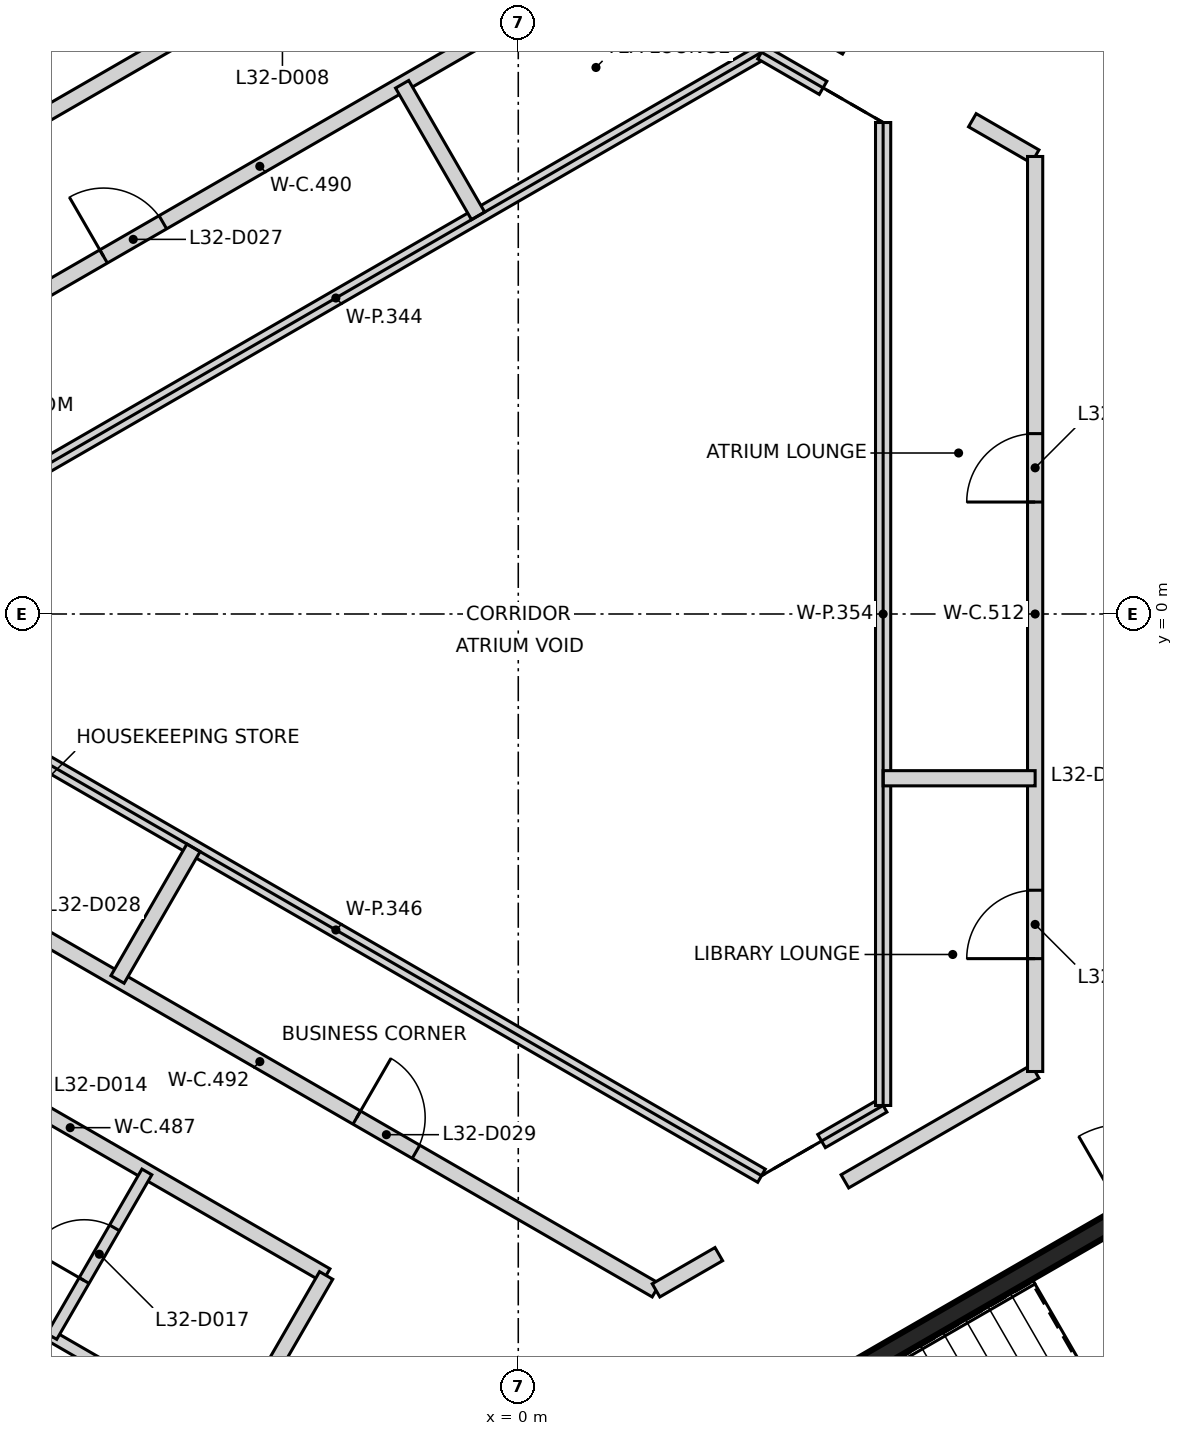
"""IFC4 building model, lengths in metres.
Left out: names, types, materials, properties, quantities, classifications, styles, units other than length and angle.
Written with IfcOpenShell. Run it as: python <this file> out.ifc"""

import sys

from ifc_helpers import new_model, si_unit, direction, frame, frame_2d, origin, place, context, subcontext, project, spatial, rectangle, extrude, element, fill, save


model = new_model("IFC4")
c1 = context("Model", 3, precision=1e-05, world=origin(), true_north=direction((0.0, 1.0)))
c2 = subcontext(c1, "Body", "Model", "MODEL_VIEW")
j1 = project(units=[si_unit("LENGTHUNIT", "METRE"), si_unit("PLANEANGLEUNIT", "RADIAN")], contexts=[c1])
p1 = place(None, origin())
s1 = spatial("IfcSite", under=j1, at=p1, CompositionType="ELEMENT")
p2 = place(p1, origin())
s2 = spatial("IfcBuilding", under=s1, at=p2, CompositionType="ELEMENT")
p3 = place(p2, frame((0.0, 0.0, 132.4)))
s3 = spatial("IfcBuildingStorey", under=s2, at=p3, CompositionType="ELEMENT", Elevation=132.4)
p4 = place(p3, frame((10.42, 6.498, 0.0), z_axis=(0.0, 0.0, 1.0), x_axis=(-0.866021906294, 0.500006057782, 0.0)))
e1 = element("IfcWall", 1, at=p4, inside=s3, PredefinedType="SHEAR", context=c2, shape_type="SweptSolid", body=[
    extrude(rectangle(XDim=11.55, YDim=0.25, at=frame_2d((5.775, 0.0))), origin(), (0.0, 0.0, 1.0), 3.2),
])
p5 = place(p4, frame((10.025, 0.0, 0.0)))
e2 = element("IfcOpeningElement", 2, at=p5, cuts=e1, PredefinedType="OPENING", context=c2, shape_type="SweptSolid", body=[
    extrude(rectangle(XDim=1.2, YDim=2.1, at=frame_2d((0.6, 1.05))), frame((0.0, 0.135, 0.0), z_axis=(0.0, -1.0, 0.0), x_axis=(1.0, 0.0, 0.0)), (0.0, 0.0, 1.0), 0.27),
])
p6 = place(p4, frame((8.725, 0.0, 0.0)))
e3 = element("IfcOpeningElement", 3, at=p6, cuts=e1, PredefinedType="OPENING", context=c2, shape_type="SweptSolid", body=[
    extrude(rectangle(XDim=1.2, YDim=2.1, at=frame_2d((0.6, 1.05))), frame((0.0, 0.135, 0.0), z_axis=(0.0, -1.0, 0.0), x_axis=(1.0, 0.0, 0.0)), (0.0, 0.0, 1.0), 0.27),
])
p7 = place(p3, frame((0.417, -12.273, 0.0), z_axis=(0.0, 0.0, 1.0), x_axis=(0.866021906294, 0.500006057782, 0.0)))
e4 = element("IfcWall", 4, at=p7, inside=s3, PredefinedType="SHEAR", context=c2, shape_type="SweptSolid", body=[
    extrude(rectangle(XDim=11.55, YDim=0.25, at=frame_2d((5.775, 0.0))), origin(), (0.0, 0.0, 1.0), 3.2),
])
p8 = place(p7, frame((10.025, 0.0, 0.0)))
e5 = element("IfcOpeningElement", 5, at=p8, cuts=e4, PredefinedType="OPENING", context=c2, shape_type="SweptSolid", body=[
    extrude(rectangle(XDim=1.2, YDim=2.1, at=frame_2d((0.6, 1.05))), frame((0.0, 0.135, 0.0), z_axis=(0.0, -1.0, 0.0), x_axis=(1.0, 0.0, 0.0)), (0.0, 0.0, 1.0), 0.27),
])
p9 = place(p7, frame((8.725, 0.0, 0.0)))
e6 = element("IfcOpeningElement", 6, at=p9, cuts=e4, PredefinedType="OPENING", context=c2, shape_type="SweptSolid", body=[
    extrude(rectangle(XDim=1.2, YDim=2.1, at=frame_2d((0.6, 1.05))), frame((0.0, 0.135, 0.0), z_axis=(0.0, -1.0, 0.0), x_axis=(1.0, 0.0, 0.0)), (0.0, 0.0, 1.0), 0.27),
])
p10 = place(p3, frame((-9.262, -4.814, 0.0), z_axis=(0.0, 0.0, 1.0), x_axis=(0.866109782156, -0.499853823887, 0.0)))
e7 = element("IfcWall", 7, at=p10, inside=s3, PredefinedType="PARTITIONING", context=c2, shape_type="SweptSolid", body=[
    extrude(rectangle(XDim=7.776, YDim=0.2, at=frame_2d((3.888, 0.0))), origin(), (0.0, 0.0, 1.0), 3.2),
])
p11 = place(p10, frame((2.314, 0.0, 0.0)))
e8 = element("IfcOpeningElement", 8, at=p11, cuts=e7, PredefinedType="OPENING", context=c2, shape_type="SweptSolid", body=[
    extrude(rectangle(XDim=0.95, YDim=2.1, at=frame_2d((0.475, 1.05))), frame((0.0, 0.11, 0.0), z_axis=(0.0, -1.0, 0.0), x_axis=(1.0, 0.0, 0.0)), (0.0, 0.0, 1.0), 0.22),
])
p12 = place(p3, frame((-8.613, 2.881, 0.0), z_axis=(0.0, 0.0, 1.0), x_axis=(0.866103179807, 0.499865263774, 0.0)))
e9 = element("IfcWall", 9, at=p12, inside=s3, PredefinedType="PARTITIONING", context=c2, shape_type="SweptSolid", body=[
    extrude(rectangle(XDim=12.036, YDim=0.2, at=frame_2d((6.018, 0.0))), origin(), (0.0, 0.0, 1.0), 3.2),
])
p13 = place(p12, frame((9.652, 0.0, 0.0)))
e10 = element("IfcOpeningElement", 10, at=p13, cuts=e9, PredefinedType="OPENING", context=c2, shape_type="SweptSolid", body=[
    extrude(rectangle(XDim=0.9, YDim=2.1, at=frame_2d((0.45, 1.05))), frame((0.0, 0.11, 0.0), z_axis=(0.0, -1.0, 0.0), x_axis=(1.0, 0.0, 0.0)), (0.0, 0.0, 1.0), 0.22),
])
p14 = place(p12, frame((3.646, 0.0, 0.0)))
e11 = element("IfcOpeningElement", 11, at=p14, cuts=e9, PredefinedType="OPENING", context=c2, shape_type="SweptSolid", body=[
    extrude(rectangle(XDim=0.9, YDim=2.1, at=frame_2d((0.45, 1.05))), frame((0.0, 0.11, 0.0), z_axis=(0.0, -1.0, 0.0), x_axis=(1.0, 0.0, 0.0)), (0.0, 0.0, 1.0), 0.22),
])
p15 = place(p3, frame((-8.612, -2.88, 0.0), z_axis=(0.0, 0.0, 1.0), x_axis=(0.866035279512, -0.499982894348, 0.0)))
e12 = element("IfcWall", 12, at=p15, inside=s3, PredefinedType="PARTITIONING", context=c2, shape_type="SweptSolid", body=[
    extrude(rectangle(XDim=12.037, YDim=0.2, at=frame_2d((6.018, 0.0))), origin(), (0.0, 0.0, 1.0), 3.2),
])
p16 = place(p15, frame((1.484, 0.0, 0.0)))
e13 = element("IfcOpeningElement", 13, at=p16, cuts=e12, PredefinedType="OPENING", context=c2, shape_type="SweptSolid", body=[
    extrude(rectangle(XDim=0.9, YDim=2.1, at=frame_2d((0.45, 1.05))), frame((0.0, 0.11, 0.0), z_axis=(0.0, -1.0, 0.0), x_axis=(1.0, 0.0, 0.0)), (0.0, 0.0, 1.0), 0.22),
])
p17 = place(p15, frame((7.491, 0.0, 0.0)))
e14 = element("IfcOpeningElement", 14, at=p17, cuts=e12, PredefinedType="OPENING", context=c2, shape_type="SweptSolid", body=[
    extrude(rectangle(XDim=0.9, YDim=2.1, at=frame_2d((0.45, 1.05))), frame((0.0, 0.11, 0.0), z_axis=(0.0, -1.0, 0.0), x_axis=(1.0, 0.0, 0.0)), (0.0, 0.0, 1.0), 0.22),
])
p18 = place(p3, frame((-7.862, 5.624, 0.0), z_axis=(0.0, 0.0, 1.0), x_axis=(0.866109024618, 0.499855136491, 0.0)))
e15 = element("IfcWall", 15, at=p18, inside=s3, PredefinedType="PARTITIONING", context=c2, shape_type="SweptSolid", body=[
    extrude(rectangle(XDim=9.61, YDim=0.2, at=frame_2d((4.805, 0.0))), origin(), (0.0, 0.0, 1.0), 3.2),
])
p19 = place(p18, frame((6.345, 0.0, 0.0)))
e16 = element("IfcOpeningElement", 16, at=p19, cuts=e15, PredefinedType="OPENING", context=c2, shape_type="SweptSolid", body=[
    extrude(rectangle(XDim=0.95, YDim=2.1, at=frame_2d((0.475, 1.05))), frame((0.0, 0.11, 0.0), z_axis=(0.0, -1.0, 0.0), x_axis=(1.0, 0.0, 0.0)), (0.0, 0.0, 1.0), 0.22),
])
p20 = place(p18, frame((5.02, 0.0, 0.0)))
e17 = element("IfcOpeningElement", 17, at=p20, cuts=e15, PredefinedType="OPENING", context=c2, shape_type="SweptSolid", body=[
    extrude(rectangle(XDim=0.95, YDim=2.1, at=frame_2d((0.475, 1.05))), frame((0.0, 0.11, 0.0), z_axis=(0.0, -1.0, 0.0), x_axis=(1.0, 0.0, 0.0)), (0.0, 0.0, 1.0), 0.22),
])
p21 = place(p3, frame((-4.629, -12.341, 0.0), z_axis=(0.0, 0.0, 1.0), x_axis=(0.500069467685, 0.865985292883, 0.0)))
e18 = element("IfcWall", 18, at=p21, inside=s3, PredefinedType="PARTITIONING", context=c2, shape_type="SweptSolid", body=[
    extrude(rectangle(XDim=4.202, YDim=0.2, at=frame_2d((2.101, 0.0))), origin(), (0.0, 0.0, 1.0), 3.2),
])
p22 = place(p21, frame((0.564, 0.0, 0.0)))
e19 = element("IfcOpeningElement", 19, at=p22, cuts=e18, PredefinedType="OPENING", context=c2, shape_type="SweptSolid", body=[
    extrude(rectangle(XDim=0.95, YDim=2.1, at=frame_2d((0.475, 1.05))), frame((0.0, 0.11, 0.0), z_axis=(0.0, -1.0, 0.0), x_axis=(1.0, 0.0, 0.0)), (0.0, 0.0, 1.0), 0.22),
])
p23 = place(p3, frame((1.812, -8.898, 0.0), z_axis=(0.0, 0.0, 1.0), x_axis=(0.866108878364, 0.499855389907, 0.0)))
e20 = element("IfcWall", 20, at=p23, inside=s3, PredefinedType="PARTITIONING", context=c2, shape_type="SweptSolid", body=[
    extrude(rectangle(XDim=0.954, YDim=0.2, at=frame_2d((0.477, 0.0))), origin(), (0.0, 0.0, 1.0), 3.2),
])
p24 = place(p3, frame((1.813, 8.899, 0.0), z_axis=(0.0, 0.0, 1.0), x_axis=(0.865957732194, -0.50011719232, 0.0)))
e21 = element("IfcWall", 21, at=p24, inside=s3, PredefinedType="PARTITIONING", context=c2, shape_type="SweptSolid", body=[
    extrude(rectangle(XDim=2.891, YDim=0.2, at=frame_2d((1.445, 0.0))), origin(), (0.0, 0.0, 1.0), 2.3),
])
p25 = place(p3, frame((4.297, -7.464, 0.0), z_axis=(0.0, 0.0, 1.0), x_axis=(0.86602521942, 0.500000319328, 0.0)))
e22 = element("IfcWall", 22, at=p25, inside=s3, PredefinedType="PARTITIONING", context=c2, shape_type="SweptSolid", body=[
    extrude(rectangle(XDim=2.89, YDim=0.2, at=frame_2d((1.445, 0.0))), origin(), (0.0, 0.0, 1.0), 2.3),
])
p26 = place(p3, frame((5.974, 6.496, 0.0), z_axis=(0.0, 0.0, 1.0), x_axis=(0.865934055563, -0.500158186394, 0.0)))
e23 = element("IfcWall", 23, at=p26, inside=s3, PredefinedType="PARTITIONING", context=c2, shape_type="SweptSolid", body=[
    extrude(rectangle(XDim=0.954, YDim=0.2, at=frame_2d((0.477, 0.0))), origin(), (0.0, 0.0, 1.0), 3.2),
])
p27 = place(p3, frame((6.8, -6.019, 0.0), z_axis=(0.0, 0.0, 1.0), x_axis=(0.0, 1.0, 0.0)))
e24 = element("IfcWall", 24, at=p27, inside=s3, PredefinedType="PARTITIONING", context=c2, shape_type="SweptSolid", body=[
    extrude(rectangle(XDim=12.038, YDim=0.2, at=frame_2d((6.019, 0.0))), origin(), (0.0, 0.0, 1.0), 3.2),
])
p28 = place(p27, frame((1.485, 0.0, 0.0)))
e25 = element("IfcOpeningElement", 25, at=p28, cuts=e24, PredefinedType="OPENING", context=c2, shape_type="SweptSolid", body=[
    extrude(rectangle(XDim=0.9, YDim=2.1, at=frame_2d((0.45, 1.05))), frame((0.0, 0.11, 0.0), z_axis=(0.0, -1.0, 0.0), x_axis=(1.0, 0.0, 0.0)), (0.0, 0.0, 1.0), 0.22),
])
p29 = place(p27, frame((7.492, 0.0, 0.0)))
e26 = element("IfcOpeningElement", 26, at=p29, cuts=e24, PredefinedType="OPENING", context=c2, shape_type="SweptSolid", body=[
    extrude(rectangle(XDim=0.9, YDim=2.1, at=frame_2d((0.45, 1.05))), frame((0.0, 0.11, 0.0), z_axis=(0.0, -1.0, 0.0), x_axis=(1.0, 0.0, 0.0)), (0.0, 0.0, 1.0), 0.22),
])
for number, where, z_axis, x_axis in (
    (27, (-8.0, 0.924, 0.0), (0.0, 0.0, 1.0), (0.866, 0.5, 0.0)),
    (28, (-8.0, -0.924, 0.0), (0.0, 0.0, 1.0), (0.866, -0.5, 0.0)),
):
    element("IfcWall", number, at=place(p3, frame(where, z_axis=z_axis, x_axis=x_axis)), inside=s3, PredefinedType="PARTITIONING", context=c2, shape_type="SweptSolid", body=[
        extrude(rectangle(XDim=12.932, YDim=0.2, at=frame_2d((6.466, 0.0))), origin(), (0.0, 0.0, 1.0), 2.3),
    ])
p30 = place(p3, frame((-5.272, -4.808, 0.0), z_axis=(0.0, 0.0, 1.0), x_axis=(0.499880961361, 0.866094119867, 0.0)))
e29 = element("IfcWall", 29, at=p30, inside=s3, PredefinedType="PARTITIONING", context=c2, shape_type="SweptSolid", body=[
    extrude(rectangle(XDim=2.0, YDim=0.2, at=frame_2d((1.0, 0.0))), origin(), (0.0, 0.0, 1.0), 2.3),
])
p31 = place(p3, frame((-1.528, 6.969, 0.0), z_axis=(0.0, 0.0, 1.0), x_axis=(0.500000846469, -0.866024915075, 0.0)))
e30 = element("IfcWall", 30, at=p31, inside=s3, PredefinedType="PARTITIONING", context=c2, shape_type="SweptSolid", body=[
    extrude(rectangle(XDim=1.999, YDim=0.2, at=frame_2d((1.0, 0.0))), origin(), (0.0, 0.0, 1.0), 3.2),
])
p32 = place(p3, frame((3.2, 7.39, 0.0), z_axis=(0.0, 0.0, 1.0), x_axis=(0.865985641702, -0.500068863623, 0.0)))
e31 = element("IfcWall", 31, at=p32, inside=s3, PredefinedType="PARTITIONING", context=c2, shape_type="SweptSolid", body=[
    extrude(rectangle(XDim=0.935, YDim=0.2, at=frame_2d((0.468, 0.0))), origin(), (0.0, 0.0, 1.0), 2.3),
])
p33 = place(p3, frame((3.99, -6.934, 0.0), z_axis=(0.0, 0.0, 1.0), x_axis=(0.865872609263, 0.500264554538, 0.0)))
e32 = element("IfcWall", 32, at=p33, inside=s3, PredefinedType="PARTITIONING", context=c2, shape_type="SweptSolid", body=[
    extrude(rectangle(XDim=0.936, YDim=0.2, at=frame_2d((0.468, 0.0))), origin(), (0.0, 0.0, 1.0), 2.3),
])
p34 = place(p3, frame((4.8, -6.466, 0.0), z_axis=(0.0, 0.0, 1.0), x_axis=(0.0, 1.0, 0.0)))
e33 = element("IfcWall", 33, at=p34, inside=s3, PredefinedType="PARTITIONING", context=c2, shape_type="SweptSolid", body=[
    extrude(rectangle(XDim=12.932, YDim=0.2, at=frame_2d((6.466, 0.0))), origin(), (0.0, 0.0, 1.0), 2.3),
])
p35 = place(p3, frame((4.8, -2.161, 0.0), z_axis=(0.0, 0.0, 1.0), x_axis=(1.0, 0.0, 0.0)))
e34 = element("IfcWall", 34, at=p35, inside=s3, PredefinedType="PARTITIONING", context=c2, shape_type="SweptSolid", body=[
    extrude(rectangle(XDim=2.0, YDim=0.2, at=frame_2d((1.0, 0.0))), origin(), (0.0, 0.0, 1.0), 2.3),
])
p36 = place(p3, frame((-6.137, -9.505, 0.0), z_axis=(0.0, 0.0, 1.0), x_axis=(0.866000497904, -0.50004313577, 0.0)))
e35 = element("IfcWall", 35, at=p36, inside=s3, PredefinedType="PARTITIONING", context=c2, shape_type="SweptSolid", body=[
    extrude(rectangle(XDim=2.724, YDim=0.15, at=frame_2d((1.362, 0.0))), origin(), (0.0, 0.0, 1.0), 3.2),
])
p37 = place(p3, frame((-6.137, -9.505, 0.0), z_axis=(0.0, 0.0, 1.0), x_axis=(0.500339416332, 0.86582935297, 0.0)))
e36 = element("IfcWall", 36, at=p37, inside=s3, PredefinedType="PARTITIONING", context=c2, shape_type="SweptSolid", body=[
    extrude(rectangle(XDim=2.5, YDim=0.15, at=frame_2d((1.25, 0.0))), origin(), (0.0, 0.0, 1.0), 3.2),
])
p38 = place(p37, frame((0.85, 0.0, 0.0)))
e37 = element("IfcOpeningElement", 37, at=p38, cuts=e36, PredefinedType="OPENING", context=c2, shape_type="SweptSolid", body=[
    extrude(rectangle(XDim=0.8, YDim=2.1, at=frame_2d((0.4, 1.05))), frame((0.0, 0.085, 0.0), z_axis=(0.0, -1.0, 0.0), x_axis=(1.0, 0.0, 0.0)), (0.0, 0.0, 1.0), 0.17),
])
p39 = place(p38, frame((0.8, 0.0, 0.0), z_axis=(0.0, 0.0, 1.0), x_axis=(-1.0, 0.0, 0.0)))
e38 = element("IfcDoor", 38, at=p39, inside=s3, OperationType="SINGLE_SWING_LEFT", PredefinedType="DOOR", context=c2, shape_type="SweptSolid", body=[
    extrude(rectangle(XDim=0.8, YDim=2.1, at=frame_2d((0.4, 1.05))), frame((0.0, 0.025, 0.0), z_axis=(0.0, -1.0, 0.0), x_axis=(1.0, 0.0, 0.0)), (0.0, 0.0, 1.0), 0.05),
])
fill(e37, e38)
p40 = place(p28, origin())
e39 = element("IfcDoor", 39, at=p40, inside=s3, OperationType="SINGLE_SWING_LEFT", PredefinedType="DOOR", context=c2, shape_type="SweptSolid", body=[
    extrude(rectangle(XDim=0.9, YDim=2.1, at=frame_2d((0.45, 1.05))), frame((0.0, 0.025, 0.0), z_axis=(0.0, -1.0, 0.0), x_axis=(1.0, 0.0, 0.0)), (0.0, 0.0, 1.0), 0.05),
])
fill(e25, e39)
p41 = place(p29, origin())
e40 = element("IfcDoor", 40, at=p41, inside=s3, OperationType="SINGLE_SWING_LEFT", PredefinedType="DOOR", context=c2, shape_type="SweptSolid", body=[
    extrude(rectangle(XDim=0.9, YDim=2.1, at=frame_2d((0.45, 1.05))), frame((0.0, 0.025, 0.0), z_axis=(0.0, -1.0, 0.0), x_axis=(1.0, 0.0, 0.0)), (0.0, 0.0, 1.0), 0.05),
])
fill(e26, e40)
p42 = place(p14, frame((0.9, 0.0, 0.0), z_axis=(0.0, 0.0, 1.0), x_axis=(-1.0, 0.0, 0.0)))
e41 = element("IfcDoor", 41, at=p42, inside=s3, OperationType="SINGLE_SWING_LEFT", PredefinedType="DOOR", context=c2, shape_type="SweptSolid", body=[
    extrude(rectangle(XDim=0.9, YDim=2.1, at=frame_2d((0.45, 1.05))), frame((0.0, 0.025, 0.0), z_axis=(0.0, -1.0, 0.0), x_axis=(1.0, 0.0, 0.0)), (0.0, 0.0, 1.0), 0.05),
])
fill(e11, e41)
p43 = place(p17, origin())
e42 = element("IfcDoor", 42, at=p43, inside=s3, OperationType="SINGLE_SWING_LEFT", PredefinedType="DOOR", context=c2, shape_type="SweptSolid", body=[
    extrude(rectangle(XDim=0.9, YDim=2.1, at=frame_2d((0.45, 1.05))), frame((0.0, 0.025, 0.0), z_axis=(0.0, -1.0, 0.0), x_axis=(1.0, 0.0, 0.0)), (0.0, 0.0, 1.0), 0.05),
])
fill(e14, e42)
save(model, sys.argv[1])
